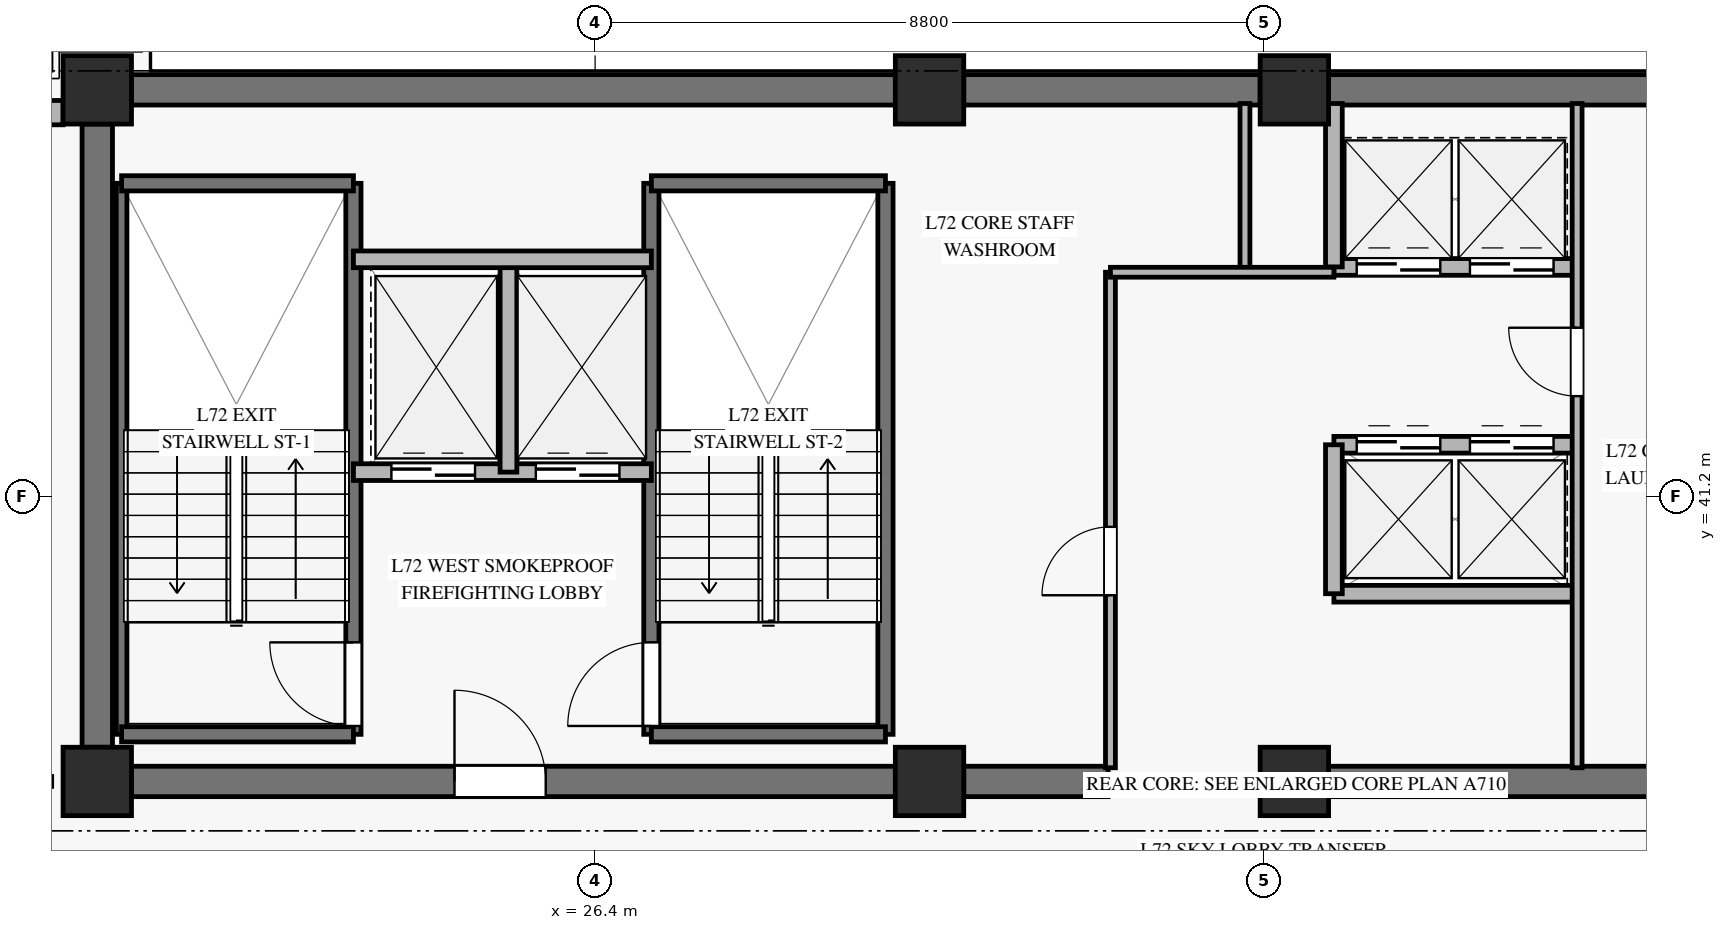
"""IFC4 building model, lengths in metres.
Left out: names, types, materials, properties, quantities, classifications, styles, units other than length and angle.
Written with IfcOpenShell. Run it as: python <this file> out.ifc"""

import sys

from ifc_helpers import new_model, si_unit, direction, frame, frame_2d, origin, origin_2d, place, context, subcontext, project, spatial, rectangle, extrude, source, transform, mapped, element, fill, save


model = new_model("IFC4")
c1 = context("Model", 3, precision=1e-05, world=origin(), true_north=direction((0.0, 1.0)))
c2 = subcontext(c1, "Body", "Model", "MODEL_VIEW")
j1 = project(units=[si_unit("LENGTHUNIT", "METRE"), si_unit("PLANEANGLEUNIT", "RADIAN")], contexts=[c1])
p1 = place(None, origin())
s1 = spatial("IfcSite", under=j1, at=p1, CompositionType="ELEMENT")
p2 = place(p1, origin())
s2 = spatial("IfcBuilding", under=s1, at=p2, CompositionType="ELEMENT")
p3 = place(p2, frame((0.0, 0.0, 279.1)))
s3 = spatial("IfcBuildingStorey", under=s2, at=p3, CompositionType="ELEMENT", Elevation=279.1)
m1 = source(origin(), c2, "Body", "SweptSolid", [
    extrude(rectangle(XDim=0.9, YDim=0.9, at=origin_2d()), origin(), (0.0, 0.0, 1.0), 6.52),
])
for number, where, z_axis, x_axis in (
    (1, (19.85, 37.45, 0.0), (0.0, 0.0, 1.0), (1.0, 0.0, 0.0)),
    (2, (19.85, 46.55, 0.0), (0.0, 0.0, 1.0), (1.0, 0.0, 0.0)),
    (3, (30.8, 37.45, 0.0), (0.0, 0.0, 1.0), (1.0, 0.0, 0.0)),
    (4, (30.8, 46.55, 0.0), (0.0, 0.0, 1.0), (1.0, 0.0, 0.0)),
    (5, (35.6, 37.45, 0.0), (0.0, 0.0, 1.0), (1.0, 0.0, 0.0)),
    (6, (35.6, 46.55, 0.0), (0.0, 0.0, 1.0), (1.0, 0.0, 0.0)),
):
    element("IfcColumn", number, at=place(p3, frame(where, z_axis=z_axis, x_axis=x_axis)), inside=s3, PredefinedType="PILASTER", context=c2, shape_type="MappedRepresentation", body=[
        mapped(m1, transform((0.0, 0.0, 0.0), x_axis=(1.0, 0.0, 0.0), y_axis=(0.0, 1.0, 0.0), z_axis=(0.0, 0.0, 1.0), scale=1.0)),
    ])
p4 = place(p3, frame((20.3, 46.55, 0.0), z_axis=(0.0, 0.0, 1.0), x_axis=(1.0, 0.0, 0.0)))
e7 = element("IfcWall", 7, at=p4, inside=s3, PredefinedType="SHEAR", context=c2, shape_type="SweptSolid", body=[
    extrude(rectangle(XDim=10.05, YDim=0.4, at=frame_2d((5.025, 0.0))), origin(), (0.0, 0.0, 1.0), 6.52),
])
p5 = place(p3, frame((31.25, 46.55, 0.0), z_axis=(0.0, 0.0, 1.0), x_axis=(1.0, 0.0, 0.0)))
e8 = element("IfcWall", 8, at=p5, inside=s3, PredefinedType="SHEAR", context=c2, shape_type="SweptSolid", body=[
    extrude(rectangle(XDim=3.9, YDim=0.4, at=frame_2d((1.95, 0.0))), origin(), (0.0, 0.0, 1.0), 6.52),
])
p6 = place(p3, frame((36.05, 46.55, 0.0), z_axis=(0.0, 0.0, 1.0), x_axis=(1.0, 0.0, 0.0)))
e9 = element("IfcWall", 9, at=p6, inside=s3, PredefinedType="SHEAR", context=c2, shape_type="SweptSolid", body=[
    extrude(rectangle(XDim=7.8, YDim=0.4, at=frame_2d((3.9, 0.0))), origin(), (0.0, 0.0, 1.0), 6.52),
])
p7 = place(p3, frame((20.3, 37.45, 0.0), z_axis=(0.0, 0.0, 1.0), x_axis=(1.0, 0.0, 0.0)))
e10 = element("IfcWall", 10, at=p7, inside=s3, PredefinedType="SHEAR", context=c2, shape_type="SweptSolid", body=[
    extrude(rectangle(XDim=10.05, YDim=0.4, at=frame_2d((5.025, 0.0))), origin(), (0.0, 0.0, 1.0), 6.52),
])
p8 = place(p7, frame((4.25, 0.0, 0.0)))
e11 = element("IfcOpeningElement", 11, at=p8, cuts=e10, PredefinedType="OPENING", context=c2, shape_type="SweptSolid", body=[
    extrude(rectangle(XDim=1.2, YDim=2.15, at=frame_2d((0.6, 1.075))), frame((0.0, 0.21, 0.0), z_axis=(0.0, -1.0, 0.0), x_axis=(1.0, 0.0, 0.0)), (0.0, 0.0, 1.0), 0.42),
])
p9 = place(p3, frame((31.25, 37.45, 0.0), z_axis=(0.0, 0.0, 1.0), x_axis=(1.0, 0.0, 0.0)))
e12 = element("IfcWall", 12, at=p9, inside=s3, PredefinedType="SHEAR", context=c2, shape_type="SweptSolid", body=[
    extrude(rectangle(XDim=1.9, YDim=0.4, at=frame_2d((0.95, 0.0))), origin(), (0.0, 0.0, 1.0), 6.52),
])
p10 = place(p3, frame((36.05, 37.45, 0.0), z_axis=(0.0, 0.0, 1.0), x_axis=(1.0, 0.0, 0.0)))
e13 = element("IfcWall", 13, at=p10, inside=s3, PredefinedType="SHEAR", context=c2, shape_type="SweptSolid", body=[
    extrude(rectangle(XDim=7.8, YDim=0.4, at=frame_2d((3.9, 0.0))), origin(), (0.0, 0.0, 1.0), 6.52),
])
p11 = place(p3, frame((19.85, 37.9, 0.0), z_axis=(0.0, 0.0, 1.0), x_axis=(0.0, 1.0, 0.0)))
e14 = element("IfcWall", 14, at=p11, inside=s3, PredefinedType="SHEAR", context=c2, shape_type="SweptSolid", body=[
    extrude(rectangle(XDim=8.2, YDim=0.4, at=frame_2d((4.1, 0.0))), origin(), (0.0, 0.0, 1.0), 6.52),
])
p12 = place(p3, frame((12.311, 46.25, 0.0), z_axis=(0.0, 0.0, 1.0), x_axis=(1.0, 0.0, 0.0)))
e15 = element("IfcWall", 15, at=p12, inside=s3, PredefinedType="SOLIDWALL", context=c2, shape_type="SweptSolid", body=[
    extrude(rectangle(XDim=7.089, YDim=0.32, at=frame_2d((3.544, 0.0))), origin(), (0.0, 0.0, 1.0), 6.15),
])
p13 = place(p12, frame((2.744, 0.0, 0.45)))
e16 = element("IfcOpeningElement", 16, at=p13, cuts=e15, PredefinedType="OPENING", context=c2, shape_type="SweptSolid", body=[
    extrude(rectangle(XDim=1.6, YDim=2.0, at=frame_2d((0.8, 1.0))), frame((0.0, 0.17, 0.0), z_axis=(0.0, -1.0, 0.0), x_axis=(1.0, 0.0, 0.0)), (0.0, 0.0, 1.0), 0.34),
])
p14 = place(p3, frame((20.17, 38.07, 0.0), z_axis=(0.0, 0.0, 1.0), x_axis=(0.0, 1.0, 0.0)))
e17 = element("IfcWall", 17, at=p14, inside=s3, PredefinedType="SOLIDWALL", context=c2, shape_type="SweptSolid", body=[
    extrude(rectangle(XDim=7.25, YDim=0.14, at=frame_2d((3.625, 0.0))), origin(), (0.0, 0.0, 1.0), 6.8),
])
p15 = place(p3, frame((23.22, 38.07, 0.0), z_axis=(0.0, 0.0, 1.0), x_axis=(0.0, 1.0, 0.0)))
e18 = element("IfcWall", 18, at=p15, inside=s3, PredefinedType="SOLIDWALL", context=c2, shape_type="SweptSolid", body=[
    extrude(rectangle(XDim=7.25, YDim=0.2, at=frame_2d((3.625, 0.0))), origin(), (0.0, 0.0, 1.0), 6.8),
])
p16 = place(p15, frame((0.11, 0.0, 0.0)))
e19 = element("IfcOpeningElement", 19, at=p16, cuts=e18, PredefinedType="OPENING", context=c2, shape_type="SweptSolid", body=[
    extrude(rectangle(XDim=1.1, YDim=2.15, at=frame_2d((0.55, 1.075))), frame((0.0, 0.11, 0.0), z_axis=(0.0, -1.0, 0.0), x_axis=(1.0, 0.0, 0.0)), (0.0, 0.0, 1.0), 0.22),
])
for number, where, z_axis, x_axis in (
    (20, (20.17, 45.32, 0.0), (0.0, 0.0, 1.0), (1.0, 0.0, 0.0)),
    (21, (20.17, 38.07, 0.0), (0.0, 0.0, 1.0), (1.0, 0.0, 0.0)),
):
    element("IfcWall", number, at=place(p3, frame(where, z_axis=z_axis, x_axis=x_axis)), inside=s3, PredefinedType="SOLIDWALL", context=c2, shape_type="SweptSolid", body=[
        extrude(rectangle(XDim=3.05, YDim=0.2, at=frame_2d((1.525, 0.0))), origin(), (0.0, 0.0, 1.0), 6.8),
    ])
p17 = place(p3, frame((27.14, 38.07, 0.0), z_axis=(0.0, 0.0, 1.0), x_axis=(0.0, 1.0, 0.0)))
e22 = element("IfcWall", 22, at=p17, inside=s3, PredefinedType="SOLIDWALL", context=c2, shape_type="SweptSolid", body=[
    extrude(rectangle(XDim=7.25, YDim=0.2, at=frame_2d((3.625, 0.0))), origin(), (0.0, 0.0, 1.0), 6.8),
])
p18 = place(p17, frame((0.11, 0.0, 0.0)))
e23 = element("IfcOpeningElement", 23, at=p18, cuts=e22, PredefinedType="OPENING", context=c2, shape_type="SweptSolid", body=[
    extrude(rectangle(XDim=1.1, YDim=2.15, at=frame_2d((0.55, 1.075))), frame((0.0, 0.11, 0.0), z_axis=(0.0, -1.0, 0.0), x_axis=(1.0, 0.0, 0.0)), (0.0, 0.0, 1.0), 0.22),
])
p19 = place(p3, frame((30.22, 38.07, 0.0), z_axis=(0.0, 0.0, 1.0), x_axis=(0.0, 1.0, 0.0)))
e24 = element("IfcWall", 24, at=p19, inside=s3, PredefinedType="SOLIDWALL", context=c2, shape_type="SweptSolid", body=[
    extrude(rectangle(XDim=7.25, YDim=0.2, at=frame_2d((3.625, 0.0))), origin(), (0.0, 0.0, 1.0), 6.8),
])
for number, where, z_axis, x_axis in (
    (25, (27.14, 45.32, 0.0), (0.0, 0.0, 1.0), (1.0, 0.0, 0.0)),
    (26, (27.14, 38.07, 0.0), (0.0, 0.0, 1.0), (1.0, 0.0, 0.0)),
):
    element("IfcWall", number, at=place(p3, frame(where, z_axis=z_axis, x_axis=x_axis)), inside=s3, PredefinedType="SOLIDWALL", context=c2, shape_type="SweptSolid", body=[
        extrude(rectangle(XDim=3.08, YDim=0.2, at=frame_2d((1.54, 0.0))), origin(), (0.0, 0.0, 1.0), 6.8),
    ])
p20 = place(p3, frame((23.22, 41.52, 0.0), z_axis=(0.0, 0.0, 1.0), x_axis=(1.0, 0.0, 0.0)))
e27 = element("IfcWall", 27, at=p20, inside=s3, PredefinedType="SOLIDWALL", context=c2, shape_type="SweptSolid", body=[
    extrude(rectangle(XDim=3.92, YDim=0.22, at=frame_2d((1.96, 0.0))), origin(), (0.0, 0.0, 1.0), 6.52),
])
p21 = place(p20, frame((0.5, 0.0, 0.0)))
e28 = element("IfcOpeningElement", 28, at=p21, cuts=e27, PredefinedType="OPENING", context=c2, shape_type="SweptSolid", body=[
    extrude(rectangle(XDim=1.1, YDim=2.2, at=frame_2d((0.55, 1.1))), frame((0.0, 0.12, 0.0), z_axis=(0.0, -1.0, 0.0), x_axis=(1.0, 0.0, 0.0)), (0.0, 0.0, 1.0), 0.24),
])
p22 = place(p20, frame((2.4, 0.0, 0.0)))
e29 = element("IfcOpeningElement", 29, at=p22, cuts=e27, PredefinedType="OPENING", context=c2, shape_type="SweptSolid", body=[
    extrude(rectangle(XDim=1.1, YDim=2.2, at=frame_2d((0.55, 1.1))), frame((0.0, 0.12, 0.0), z_axis=(0.0, -1.0, 0.0), x_axis=(1.0, 0.0, 0.0)), (0.0, 0.0, 1.0), 0.24),
])
p23 = place(p3, frame((25.26, 41.52, 0.0), z_axis=(0.0, 0.0, 1.0), x_axis=(0.0, 1.0, 0.0)))
e30 = element("IfcWall", 30, at=p23, inside=s3, PredefinedType="SOLIDWALL", context=c2, shape_type="SweptSolid", body=[
    extrude(rectangle(XDim=2.8, YDim=0.22, at=frame_2d((1.4, 0.0))), origin(), (0.0, 0.0, 1.0), 6.52),
])
p24 = place(p3, frame((23.22, 44.32, 0.0), z_axis=(0.0, 0.0, 1.0), x_axis=(1.0, 0.0, 0.0)))
e31 = element("IfcWall", 31, at=p24, inside=s3, PredefinedType="SOLIDWALL", context=c2, shape_type="SweptSolid", body=[
    extrude(rectangle(XDim=3.92, YDim=0.22, at=frame_2d((1.96, 0.0))), origin(), (0.0, 0.0, 1.0), 6.52),
])
p25 = place(p3, frame((36.12, 44.22, 0.0), z_axis=(0.0, 0.0, 1.0), x_axis=(1.0, 0.0, 0.0)))
e32 = element("IfcWall", 32, at=p25, inside=s3, PredefinedType="SOLIDWALL", context=c2, shape_type="SweptSolid", body=[
    extrude(rectangle(XDim=3.2, YDim=0.22, at=frame_2d((1.6, 0.0))), origin(), (0.0, 0.0, 1.0), 6.52),
])
p26 = place(p25, frame((0.3, 0.0, 0.0)))
e33 = element("IfcOpeningElement", 33, at=p26, cuts=e32, PredefinedType="OPENING", context=c2, shape_type="SweptSolid", body=[
    extrude(rectangle(XDim=1.1, YDim=2.2, at=frame_2d((0.55, 1.1))), frame((0.0, 0.12, 0.0), z_axis=(0.0, -1.0, 0.0), x_axis=(1.0, 0.0, 0.0)), (0.0, 0.0, 1.0), 0.24),
])
p27 = place(p25, frame((1.79, 0.0, 0.0)))
e34 = element("IfcOpeningElement", 34, at=p27, cuts=e32, PredefinedType="OPENING", context=c2, shape_type="SweptSolid", body=[
    extrude(rectangle(XDim=1.1, YDim=2.2, at=frame_2d((0.55, 1.1))), frame((0.0, 0.12, 0.0), z_axis=(0.0, -1.0, 0.0), x_axis=(1.0, 0.0, 0.0)), (0.0, 0.0, 1.0), 0.24),
])
p28 = place(p3, frame((36.12, 41.88, 0.0), z_axis=(0.0, 0.0, 1.0), x_axis=(1.0, 0.0, 0.0)))
e35 = element("IfcWall", 35, at=p28, inside=s3, PredefinedType="SOLIDWALL", context=c2, shape_type="SweptSolid", body=[
    extrude(rectangle(XDim=3.2, YDim=0.22, at=frame_2d((1.6, 0.0))), origin(), (0.0, 0.0, 1.0), 6.52),
])
p29 = place(p28, frame((0.3, 0.0, 0.0)))
e36 = element("IfcOpeningElement", 36, at=p29, cuts=e35, PredefinedType="OPENING", context=c2, shape_type="SweptSolid", body=[
    extrude(rectangle(XDim=1.1, YDim=2.2, at=frame_2d((0.55, 1.1))), frame((0.0, 0.12, 0.0), z_axis=(0.0, -1.0, 0.0), x_axis=(1.0, 0.0, 0.0)), (0.0, 0.0, 1.0), 0.24),
])
p30 = place(p28, frame((1.79, 0.0, 0.0)))
e37 = element("IfcOpeningElement", 37, at=p30, cuts=e35, PredefinedType="OPENING", context=c2, shape_type="SweptSolid", body=[
    extrude(rectangle(XDim=1.1, YDim=2.2, at=frame_2d((0.55, 1.1))), frame((0.0, 0.12, 0.0), z_axis=(0.0, -1.0, 0.0), x_axis=(1.0, 0.0, 0.0)), (0.0, 0.0, 1.0), 0.24),
])
p31 = place(p3, frame((36.12, 39.92, 0.0), z_axis=(0.0, 0.0, 1.0), x_axis=(1.0, 0.0, 0.0)))
e38 = element("IfcWall", 38, at=p31, inside=s3, PredefinedType="SOLIDWALL", context=c2, shape_type="SweptSolid", body=[
    extrude(rectangle(XDim=3.2, YDim=0.22, at=frame_2d((1.6, 0.0))), origin(), (0.0, 0.0, 1.0), 6.52),
])
p32 = place(p3, frame((36.12, 39.92, 0.0), z_axis=(0.0, 0.0, 1.0), x_axis=(0.0, 1.0, 0.0)))
e39 = element("IfcWall", 39, at=p32, inside=s3, PredefinedType="SOLIDWALL", context=c2, shape_type="SweptSolid", body=[
    extrude(rectangle(XDim=1.96, YDim=0.22, at=frame_2d((0.98, 0.0))), origin(), (0.0, 0.0, 1.0), 6.52),
])
p33 = place(p3, frame((36.12, 44.22, 0.0), z_axis=(0.0, 0.0, 1.0), x_axis=(0.0, 1.0, 0.0)))
e40 = element("IfcWall", 40, at=p33, inside=s3, PredefinedType="SOLIDWALL", context=c2, shape_type="SweptSolid", body=[
    extrude(rectangle(XDim=2.15, YDim=0.22, at=frame_2d((1.075, 0.0))), origin(), (0.0, 0.0, 1.0), 6.52),
])
p34 = place(p3, frame((33.18, 37.63, 0.0), z_axis=(0.0, 0.0, 1.0), x_axis=(0.0, 1.0, 0.0)))
e41 = element("IfcWall", 41, at=p34, inside=s3, PredefinedType="PARTITIONING", context=c2, shape_type="SweptSolid", body=[
    extrude(rectangle(XDim=6.52, YDim=0.13, at=frame_2d((3.26, 0.0))), origin(), (0.0, 0.0, 1.0), 5.605),
])
p35 = place(p34, frame((2.27, 0.0, 0.0)))
e42 = element("IfcOpeningElement", 42, at=p35, cuts=e41, PredefinedType="OPENING", context=c2, shape_type="SweptSolid", body=[
    extrude(rectangle(XDim=0.9, YDim=2.1, at=frame_2d((0.45, 1.05))), frame((0.0, 0.075, 0.0), z_axis=(0.0, -1.0, 0.0), x_axis=(1.0, 0.0, 0.0)), (0.0, 0.0, 1.0), 0.15),
])
p36 = place(p3, frame((34.95, 44.15, 0.0), z_axis=(0.0, 0.0, 1.0), x_axis=(0.0, 1.0, 0.0)))
e43 = element("IfcWall", 43, at=p36, inside=s3, PredefinedType="PARTITIONING", context=c2, shape_type="SweptSolid", body=[
    extrude(rectangle(XDim=2.22, YDim=0.13, at=frame_2d((1.11, 0.0))), origin(), (0.0, 0.0, 1.0), 6.52),
])
p37 = place(p3, frame((33.18, 44.15, 0.0), z_axis=(0.0, 0.0, 1.0), x_axis=(1.0, 0.0, 0.0)))
e44 = element("IfcWall", 44, at=p37, inside=s3, PredefinedType="PARTITIONING", context=c2, shape_type="SweptSolid", body=[
    extrude(rectangle(XDim=2.94, YDim=0.13, at=frame_2d((1.47, 0.0))), origin(), (0.0, 0.0, 1.0), 5.805),
])
p38 = place(p3, frame((39.32, 37.63, 0.0), z_axis=(0.0, 0.0, 1.0), x_axis=(0.0, 1.0, 0.0)))
e45 = element("IfcWall", 45, at=p38, inside=s3, PredefinedType="PARTITIONING", context=c2, shape_type="SweptSolid", body=[
    extrude(rectangle(XDim=8.74, YDim=0.13, at=frame_2d((4.37, 0.0))), origin(), (0.0, 0.0, 1.0), 6.52),
])
p39 = place(p38, frame((4.89, 0.0, 0.0)))
e46 = element("IfcOpeningElement", 46, at=p39, cuts=e45, PredefinedType="OPENING", context=c2, shape_type="SweptSolid", body=[
    extrude(rectangle(XDim=0.9, YDim=2.1, at=frame_2d((0.45, 1.05))), frame((0.0, 0.075, 0.0), z_axis=(0.0, -1.0, 0.0), x_axis=(1.0, 0.0, 0.0)), (0.0, 0.0, 1.0), 0.15),
])
m2 = source(origin(), c2, "Body", "SweptSolid", [
    extrude(rectangle(XDim=1.1, YDim=2.15, at=frame_2d((0.55, 1.075))), frame((0.0, 0.025, 0.0), z_axis=(0.0, -1.0, 0.0), x_axis=(1.0, 0.0, 0.0)), (0.0, 0.0, 1.0), 0.05),
])
p40 = place(p16, origin())
e47 = element("IfcDoor", 47, at=p40, inside=s3, OperationType="SINGLE_SWING_RIGHT", PredefinedType="DOOR", context=c2, shape_type="MappedRepresentation", body=[
    mapped(m2, transform((0.0, 0.0, 0.0), x_axis=(1.0, 0.0, 0.0), y_axis=(0.0, 1.0, 0.0), z_axis=(0.0, 0.0, 1.0), scale=1.0)),
])
fill(e19, e47)
p41 = place(p18, origin())
e48 = element("IfcDoor", 48, at=p41, inside=s3, OperationType="SINGLE_SWING_LEFT", PredefinedType="DOOR", context=c2, shape_type="MappedRepresentation", body=[
    mapped(m2, transform((0.0, 0.0, 0.0), x_axis=(1.0, 0.0, 0.0), y_axis=(0.0, 1.0, 0.0), z_axis=(0.0, 0.0, 1.0), scale=1.0)),
])
fill(e23, e48)
m3 = source(origin(), c2, "Body", "SweptSolid", [
    extrude(rectangle(XDim=1.1, YDim=2.2, at=frame_2d((0.55, 1.1))), frame((0.0, 0.025, 0.0), z_axis=(0.0, -1.0, 0.0), x_axis=(1.0, 0.0, 0.0)), (0.0, 0.0, 1.0), 0.05),
])
p42 = place(p21, origin())
e49 = element("IfcDoor", 49, at=p42, inside=s3, OperationType="SLIDING_TO_LEFT", PredefinedType="DOOR", context=c2, shape_type="MappedRepresentation", body=[
    mapped(m3, transform((0.0, 0.0, 0.0), x_axis=(1.0, 0.0, 0.0), y_axis=(0.0, 1.0, 0.0), z_axis=(0.0, 0.0, 1.0), scale=1.0)),
])
fill(e28, e49)
p43 = place(p22, origin())
e50 = element("IfcDoor", 50, at=p43, inside=s3, OperationType="SLIDING_TO_LEFT", PredefinedType="DOOR", context=c2, shape_type="MappedRepresentation", body=[
    mapped(m3, transform((0.0, 0.0, 0.0), x_axis=(1.0, 0.0, 0.0), y_axis=(0.0, 1.0, 0.0), z_axis=(0.0, 0.0, 1.0), scale=1.0)),
])
fill(e29, e50)
m4 = source(origin(), c2, "Body", "SweptSolid", [
    extrude(rectangle(XDim=1.2, YDim=2.15, at=frame_2d((0.6, 1.075))), frame((0.0, 0.025, 0.0), z_axis=(0.0, -1.0, 0.0), x_axis=(1.0, 0.0, 0.0)), (0.0, 0.0, 1.0), 0.05),
])
p44 = place(p8, origin())
e51 = element("IfcDoor", 51, at=p44, inside=s3, OperationType="SINGLE_SWING_LEFT", PredefinedType="DOOR", context=c2, shape_type="MappedRepresentation", body=[
    mapped(m4, transform((0.0, 0.0, 0.0), x_axis=(1.0, 0.0, 0.0), y_axis=(0.0, 1.0, 0.0), z_axis=(0.0, 0.0, 1.0), scale=1.0)),
])
fill(e11, e51)
p45 = place(p26, origin())
e52 = element("IfcDoor", 52, at=p45, inside=s3, OperationType="SLIDING_TO_LEFT", PredefinedType="DOOR", context=c2, shape_type="MappedRepresentation", body=[
    mapped(m3, transform((0.0, 0.0, 0.0), x_axis=(1.0, 0.0, 0.0), y_axis=(0.0, 1.0, 0.0), z_axis=(0.0, 0.0, 1.0), scale=1.0)),
])
fill(e33, e52)
p46 = place(p27, origin())
e53 = element("IfcDoor", 53, at=p46, inside=s3, OperationType="SLIDING_TO_LEFT", PredefinedType="DOOR", context=c2, shape_type="MappedRepresentation", body=[
    mapped(m3, transform((0.0, 0.0, 0.0), x_axis=(1.0, 0.0, 0.0), y_axis=(0.0, 1.0, 0.0), z_axis=(0.0, 0.0, 1.0), scale=1.0)),
])
fill(e34, e53)
p47 = place(p29, origin())
e54 = element("IfcDoor", 54, at=p47, inside=s3, OperationType="SLIDING_TO_LEFT", PredefinedType="DOOR", context=c2, shape_type="MappedRepresentation", body=[
    mapped(m3, transform((0.0, 0.0, 0.0), x_axis=(1.0, 0.0, 0.0), y_axis=(0.0, 1.0, 0.0), z_axis=(0.0, 0.0, 1.0), scale=1.0)),
])
fill(e36, e54)
p48 = place(p30, origin())
e55 = element("IfcDoor", 55, at=p48, inside=s3, OperationType="SLIDING_TO_LEFT", PredefinedType="DOOR", context=c2, shape_type="MappedRepresentation", body=[
    mapped(m3, transform((0.0, 0.0, 0.0), x_axis=(1.0, 0.0, 0.0), y_axis=(0.0, 1.0, 0.0), z_axis=(0.0, 0.0, 1.0), scale=1.0)),
])
fill(e37, e55)
m5 = source(origin(), c2, "Body", "SweptSolid", [
    extrude(rectangle(XDim=0.9, YDim=2.1, at=frame_2d((0.45, 1.05))), frame((0.0, 0.025, 0.0), z_axis=(0.0, -1.0, 0.0), x_axis=(1.0, 0.0, 0.0)), (0.0, 0.0, 1.0), 0.05),
])
p49 = place(p35, origin())
e56 = element("IfcDoor", 56, at=p49, inside=s3, OperationType="SINGLE_SWING_LEFT", PredefinedType="DOOR", context=c2, shape_type="MappedRepresentation", body=[
    mapped(m5, transform((0.0, 0.0, 0.0), x_axis=(1.0, 0.0, 0.0), y_axis=(0.0, 1.0, 0.0), z_axis=(0.0, 0.0, 1.0), scale=1.0)),
])
fill(e42, e56)
p50 = place(p39, origin())
e57 = element("IfcDoor", 57, at=p50, inside=s3, OperationType="SINGLE_SWING_RIGHT", PredefinedType="DOOR", context=c2, shape_type="MappedRepresentation", body=[
    mapped(m5, transform((0.0, 0.0, 0.0), x_axis=(1.0, 0.0, 0.0), y_axis=(0.0, 1.0, 0.0), z_axis=(0.0, 0.0, 1.0), scale=1.0)),
])
fill(e46, e57)
save(model, sys.argv[1])
